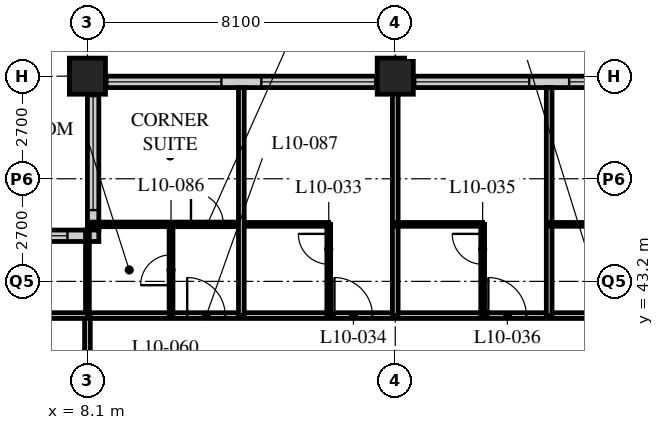
"""IFC4 building model, lengths in metres.
Left out: names, types, materials, properties, quantities, classifications, styles, units other than length and angle.
Written with IfcOpenShell. Run it as: python <this file> out.ifc"""

import sys

from ifc_helpers import new_model, si_unit, direction, frame, frame_2d, origin, origin_2d, place, context, subcontext, project, spatial, rectangle, hollow_rectangle, extrude, element, fill, save


model = new_model("IFC4")
c1 = context("Model", 3, precision=1e-05, world=origin(), true_north=direction((0.0, 1.0)))
c2 = subcontext(c1, "Body", "Model", "MODEL_VIEW")
j1 = project(units=[si_unit("LENGTHUNIT", "METRE"), si_unit("PLANEANGLEUNIT", "RADIAN")], contexts=[c1])
p1 = place(None, origin())
s1 = spatial("IfcSite", under=j1, at=p1, CompositionType="ELEMENT")
p2 = place(p1, origin())
s2 = spatial("IfcBuilding", under=s1, at=p2, CompositionType="ELEMENT")
p3 = place(p2, frame((0.0, 0.0, 46.6)))
s3 = spatial("IfcBuildingStorey", under=s2, at=p3, CompositionType="ELEMENT", Elevation=46.6)
for number, where, z_axis, x_axis in (
    (1, (8.1, 48.6, 0.0), (0.0, 0.0, 1.0), (1.0, 0.0, 0.0)),
    (2, (16.2, 48.6, 0.0), (0.0, 0.0, 1.0), (1.0, 0.0, 0.0)),
):
    element("IfcColumn", number, at=place(p3, frame(where, z_axis=z_axis, x_axis=x_axis)), inside=s3, PredefinedType="COLUMN", context=c2, shape_type="SweptSolid", body=[
        extrude(hollow_rectangle(XDim=0.95, YDim=0.95, WallThickness=0.095, at=origin_2d()), origin(), (0.0, 0.0, 1.0), 3.4),
    ])
p4 = place(p3, frame((48.3, 48.45, 0.0), z_axis=(0.0, 0.0, 1.0), x_axis=(-1.0, 0.0, 0.0)))
e3 = element("IfcWall", 3, at=p4, inside=s3, PredefinedType="SOLIDWALL", context=c2, shape_type="SweptSolid", body=[
    extrude(rectangle(XDim=40.2, YDim=0.3, at=frame_2d((20.1, 0.0))), origin(), (0.0, 0.0, 1.0), 3.19),
])
p5 = place(p4, frame((0.225, 0.0, 0.9)))
e4 = element("IfcOpeningElement", 4, at=p5, cuts=e3, PredefinedType="OPENING", context=c2, shape_type="SweptSolid", body=[
    extrude(rectangle(XDim=3.0, YDim=2.0, at=frame_2d((1.5, 1.0))), frame((0.0, 0.16, 0.0), z_axis=(0.0, -1.0, 0.0), x_axis=(1.0, 0.0, 0.0)), (0.0, 0.0, 1.0), 0.32),
])
p6 = place(p4, frame((4.275, 0.0, 0.9)))
e5 = element("IfcOpeningElement", 5, at=p6, cuts=e3, PredefinedType="OPENING", context=c2, shape_type="SweptSolid", body=[
    extrude(rectangle(XDim=3.0, YDim=2.0, at=frame_2d((1.5, 1.0))), frame((0.0, 0.16, 0.0), z_axis=(0.0, -1.0, 0.0), x_axis=(1.0, 0.0, 0.0)), (0.0, 0.0, 1.0), 0.32),
])
p7 = place(p4, frame((8.325, 0.0, 0.9)))
e6 = element("IfcOpeningElement", 6, at=p7, cuts=e3, PredefinedType="OPENING", context=c2, shape_type="SweptSolid", body=[
    extrude(rectangle(XDim=3.0, YDim=2.0, at=frame_2d((1.5, 1.0))), frame((0.0, 0.16, 0.0), z_axis=(0.0, -1.0, 0.0), x_axis=(1.0, 0.0, 0.0)), (0.0, 0.0, 1.0), 0.32),
])
p8 = place(p4, frame((12.375, 0.0, 0.9)))
e7 = element("IfcOpeningElement", 7, at=p8, cuts=e3, PredefinedType="OPENING", context=c2, shape_type="SweptSolid", body=[
    extrude(rectangle(XDim=3.0, YDim=2.0, at=frame_2d((1.5, 1.0))), frame((0.0, 0.16, 0.0), z_axis=(0.0, -1.0, 0.0), x_axis=(1.0, 0.0, 0.0)), (0.0, 0.0, 1.0), 0.32),
])
p9 = place(p4, frame((16.425, 0.0, 0.9)))
e8 = element("IfcOpeningElement", 8, at=p9, cuts=e3, PredefinedType="OPENING", context=c2, shape_type="SweptSolid", body=[
    extrude(rectangle(XDim=3.0, YDim=2.0, at=frame_2d((1.5, 1.0))), frame((0.0, 0.16, 0.0), z_axis=(0.0, -1.0, 0.0), x_axis=(1.0, 0.0, 0.0)), (0.0, 0.0, 1.0), 0.32),
])
p10 = place(p4, frame((20.475, 0.0, 0.9)))
e9 = element("IfcOpeningElement", 9, at=p10, cuts=e3, PredefinedType="OPENING", context=c2, shape_type="SweptSolid", body=[
    extrude(rectangle(XDim=3.0, YDim=2.0, at=frame_2d((1.5, 1.0))), frame((0.0, 0.16, 0.0), z_axis=(0.0, -1.0, 0.0), x_axis=(1.0, 0.0, 0.0)), (0.0, 0.0, 1.0), 0.32),
])
p11 = place(p4, frame((24.525, 0.0, 0.9)))
e10 = element("IfcOpeningElement", 10, at=p11, cuts=e3, PredefinedType="OPENING", context=c2, shape_type="SweptSolid", body=[
    extrude(rectangle(XDim=3.0, YDim=2.0, at=frame_2d((1.5, 1.0))), frame((0.0, 0.16, 0.0), z_axis=(0.0, -1.0, 0.0), x_axis=(1.0, 0.0, 0.0)), (0.0, 0.0, 1.0), 0.32),
])
p12 = place(p4, frame((28.575, 0.0, 0.9)))
e11 = element("IfcOpeningElement", 11, at=p12, cuts=e3, PredefinedType="OPENING", context=c2, shape_type="SweptSolid", body=[
    extrude(rectangle(XDim=3.0, YDim=2.0, at=frame_2d((1.5, 1.0))), frame((0.0, 0.16, 0.0), z_axis=(0.0, -1.0, 0.0), x_axis=(1.0, 0.0, 0.0)), (0.0, 0.0, 1.0), 0.32),
])
p13 = place(p4, frame((32.625, 0.0, 0.9)))
e12 = element("IfcOpeningElement", 12, at=p13, cuts=e3, PredefinedType="OPENING", context=c2, shape_type="SweptSolid", body=[
    extrude(rectangle(XDim=3.0, YDim=2.0, at=frame_2d((1.5, 1.0))), frame((0.0, 0.16, 0.0), z_axis=(0.0, -1.0, 0.0), x_axis=(1.0, 0.0, 0.0)), (0.0, 0.0, 1.0), 0.32),
])
p14 = place(p4, frame((36.675, 0.0, 0.9)))
e13 = element("IfcOpeningElement", 13, at=p14, cuts=e3, PredefinedType="OPENING", context=c2, shape_type="SweptSolid", body=[
    extrude(rectangle(XDim=3.0, YDim=2.0, at=frame_2d((1.5, 1.0))), frame((0.0, 0.16, 0.0), z_axis=(0.0, -1.0, 0.0), x_axis=(1.0, 0.0, 0.0)), (0.0, 0.0, 1.0), 0.32),
])
p15 = place(p3, frame((8.25, 48.3, 0.0), z_axis=(0.0, 0.0, 1.0), x_axis=(0.0, -1.0, 0.0)))
e14 = element("IfcWall", 14, at=p15, inside=s3, PredefinedType="SOLIDWALL", context=c2, shape_type="SweptSolid", body=[
    extrude(rectangle(XDim=3.75, YDim=0.3, at=frame_2d((1.875, 0.0))), origin(), (0.0, 0.0, 1.0), 3.19),
])
p16 = place(p15, frame((0.225, 0.0, 0.9)))
e15 = element("IfcOpeningElement", 15, at=p16, cuts=e14, PredefinedType="OPENING", context=c2, shape_type="SweptSolid", body=[
    extrude(rectangle(XDim=3.0, YDim=1.5, at=frame_2d((1.5, 0.75))), frame((0.0, 0.16, 0.0), z_axis=(0.0, -1.0, 0.0), x_axis=(1.0, 0.0, 0.0)), (0.0, 0.0, 1.0), 0.32),
])
p17 = place(p3, frame((8.4, 44.4, 0.0), z_axis=(0.0, 0.0, 1.0), x_axis=(-1.0, 0.0, 0.0)))
e16 = element("IfcWall", 16, at=p17, inside=s3, PredefinedType="SOLIDWALL", context=c2, shape_type="SweptSolid", body=[
    extrude(rectangle(XDim=4.35, YDim=0.3, at=frame_2d((2.175, 0.0))), origin(), (0.0, 0.0, 1.0), 3.19),
])
p18 = place(p17, frame((0.825, 0.0, 0.9)))
e17 = element("IfcOpeningElement", 17, at=p18, cuts=e16, PredefinedType="OPENING", context=c2, shape_type="SweptSolid", body=[
    extrude(rectangle(XDim=3.0, YDim=1.5, at=frame_2d((1.5, 0.75))), frame((0.0, 0.16, 0.0), z_axis=(0.0, -1.0, 0.0), x_axis=(1.0, 0.0, 0.0)), (0.0, 0.0, 1.0), 0.32),
])
p19 = place(p3, frame((8.1, 42.3, 0.0), z_axis=(0.0, 0.0, 1.0), x_axis=(1.0, 0.0, 0.0)))
e18 = element("IfcWall", 18, at=p19, inside=s3, PredefinedType="PARTITIONING", context=c2, shape_type="SweptSolid", body=[
    extrude(rectangle(XDim=40.5, YDim=0.15, at=frame_2d((20.25, 0.0))), origin(), (0.0, 0.0, 1.0), 3.19),
])
p20 = place(p19, frame((6.5, 0.0, 0.0)))
e19 = element("IfcOpeningElement", 19, at=p20, cuts=e18, PredefinedType="OPENING", context=c2, shape_type="SweptSolid", body=[
    extrude(rectangle(XDim=1.0, YDim=2.1, at=frame_2d((0.5, 1.05))), frame((0.0, 0.085, 0.0), z_axis=(0.0, -1.0, 0.0), x_axis=(1.0, 0.0, 0.0)), (0.0, 0.0, 1.0), 0.17),
])
p21 = place(p19, frame((10.55, 0.0, 0.0)))
e20 = element("IfcOpeningElement", 20, at=p21, cuts=e18, PredefinedType="OPENING", context=c2, shape_type="SweptSolid", body=[
    extrude(rectangle(XDim=1.0, YDim=2.1, at=frame_2d((0.5, 1.05))), frame((0.0, 0.085, 0.0), z_axis=(0.0, -1.0, 0.0), x_axis=(1.0, 0.0, 0.0)), (0.0, 0.0, 1.0), 0.17),
])
p22 = place(p19, frame((14.6, 0.0, 0.0)))
e21 = element("IfcOpeningElement", 21, at=p22, cuts=e18, PredefinedType="OPENING", context=c2, shape_type="SweptSolid", body=[
    extrude(rectangle(XDim=1.0, YDim=2.1, at=frame_2d((0.5, 1.05))), frame((0.0, 0.085, 0.0), z_axis=(0.0, -1.0, 0.0), x_axis=(1.0, 0.0, 0.0)), (0.0, 0.0, 1.0), 0.17),
])
p23 = place(p19, frame((18.65, 0.0, 0.0)))
e22 = element("IfcOpeningElement", 22, at=p23, cuts=e18, PredefinedType="OPENING", context=c2, shape_type="SweptSolid", body=[
    extrude(rectangle(XDim=1.0, YDim=2.1, at=frame_2d((0.5, 1.05))), frame((0.0, 0.085, 0.0), z_axis=(0.0, -1.0, 0.0), x_axis=(1.0, 0.0, 0.0)), (0.0, 0.0, 1.0), 0.17),
])
p24 = place(p19, frame((22.7, 0.0, 0.0)))
e23 = element("IfcOpeningElement", 23, at=p24, cuts=e18, PredefinedType="OPENING", context=c2, shape_type="SweptSolid", body=[
    extrude(rectangle(XDim=1.0, YDim=2.1, at=frame_2d((0.5, 1.05))), frame((0.0, 0.085, 0.0), z_axis=(0.0, -1.0, 0.0), x_axis=(1.0, 0.0, 0.0)), (0.0, 0.0, 1.0), 0.17),
])
p25 = place(p19, frame((26.75, 0.0, 0.0)))
e24 = element("IfcOpeningElement", 24, at=p25, cuts=e18, PredefinedType="OPENING", context=c2, shape_type="SweptSolid", body=[
    extrude(rectangle(XDim=1.0, YDim=2.1, at=frame_2d((0.5, 1.05))), frame((0.0, 0.085, 0.0), z_axis=(0.0, -1.0, 0.0), x_axis=(1.0, 0.0, 0.0)), (0.0, 0.0, 1.0), 0.17),
])
p26 = place(p19, frame((30.8, 0.0, 0.0)))
e25 = element("IfcOpeningElement", 25, at=p26, cuts=e18, PredefinedType="OPENING", context=c2, shape_type="SweptSolid", body=[
    extrude(rectangle(XDim=1.0, YDim=2.1, at=frame_2d((0.5, 1.05))), frame((0.0, 0.085, 0.0), z_axis=(0.0, -1.0, 0.0), x_axis=(1.0, 0.0, 0.0)), (0.0, 0.0, 1.0), 0.17),
])
p27 = place(p19, frame((34.85, 0.0, 0.0)))
e26 = element("IfcOpeningElement", 26, at=p27, cuts=e18, PredefinedType="OPENING", context=c2, shape_type="SweptSolid", body=[
    extrude(rectangle(XDim=1.0, YDim=2.1, at=frame_2d((0.5, 1.05))), frame((0.0, 0.085, 0.0), z_axis=(0.0, -1.0, 0.0), x_axis=(1.0, 0.0, 0.0)), (0.0, 0.0, 1.0), 0.17),
])
p28 = place(p19, frame((36.875, 0.0, 0.0)))
e27 = element("IfcOpeningElement", 27, at=p28, cuts=e18, PredefinedType="OPENING", context=c2, shape_type="SweptSolid", body=[
    extrude(rectangle(XDim=1.0, YDim=2.1, at=frame_2d((0.5, 1.05))), frame((0.0, 0.085, 0.0), z_axis=(0.0, -1.0, 0.0), x_axis=(1.0, 0.0, 0.0)), (0.0, 0.0, 1.0), 0.17),
])
p29 = place(p19, frame((2.625, 0.0, 0.0)))
e28 = element("IfcOpeningElement", 28, at=p29, cuts=e18, PredefinedType="OPENING", context=c2, shape_type="SweptSolid", body=[
    extrude(rectangle(XDim=1.0, YDim=2.1, at=frame_2d((0.5, 1.05))), frame((0.0, 0.085, 0.0), z_axis=(0.0, -1.0, 0.0), x_axis=(1.0, 0.0, 0.0)), (0.0, 0.0, 1.0), 0.17),
])
p30 = place(p3, frame((8.1, 16.2, 0.0), z_axis=(0.0, 0.0, 1.0), x_axis=(0.0, 1.0, 0.0)))
e29 = element("IfcWall", 29, at=p30, inside=s3, PredefinedType="PARTITIONING", context=c2, shape_type="SweptSolid", body=[
    extrude(rectangle(XDim=26.1, YDim=0.15, at=frame_2d((13.05, 0.0))), origin(), (0.0, 0.0, 1.0), 2.578),
])
p31 = place(p30, frame((2.75, 0.0, 0.0)))
e30 = element("IfcOpeningElement", 30, at=p31, cuts=e29, PredefinedType="OPENING", context=c2, shape_type="SweptSolid", body=[
    extrude(rectangle(XDim=1.0, YDim=2.1, at=frame_2d((0.5, 1.05))), frame((0.0, 0.085, 0.0), z_axis=(0.0, -1.0, 0.0), x_axis=(1.0, 0.0, 0.0)), (0.0, 0.0, 1.0), 0.17),
])
p32 = place(p30, frame((4.35, 0.0, 0.0)))
e31 = element("IfcOpeningElement", 31, at=p32, cuts=e29, PredefinedType="OPENING", context=c2, shape_type="SweptSolid", body=[
    extrude(rectangle(XDim=1.0, YDim=2.1, at=frame_2d((0.5, 1.05))), frame((0.0, 0.085, 0.0), z_axis=(0.0, -1.0, 0.0), x_axis=(1.0, 0.0, 0.0)), (0.0, 0.0, 1.0), 0.17),
])
p33 = place(p30, frame((10.85, 0.0, 0.0)))
e32 = element("IfcOpeningElement", 32, at=p33, cuts=e29, PredefinedType="OPENING", context=c2, shape_type="SweptSolid", body=[
    extrude(rectangle(XDim=1.0, YDim=2.1, at=frame_2d((0.5, 1.05))), frame((0.0, 0.085, 0.0), z_axis=(0.0, -1.0, 0.0), x_axis=(1.0, 0.0, 0.0)), (0.0, 0.0, 1.0), 0.17),
])
p34 = place(p30, frame((12.45, 0.0, 0.0)))
e33 = element("IfcOpeningElement", 33, at=p34, cuts=e29, PredefinedType="OPENING", context=c2, shape_type="SweptSolid", body=[
    extrude(rectangle(XDim=1.0, YDim=2.1, at=frame_2d((0.5, 1.05))), frame((0.0, 0.085, 0.0), z_axis=(0.0, -1.0, 0.0), x_axis=(1.0, 0.0, 0.0)), (0.0, 0.0, 1.0), 0.17),
])
p35 = place(p30, frame((18.65, 0.0, 0.0)))
e34 = element("IfcOpeningElement", 34, at=p35, cuts=e29, PredefinedType="OPENING", context=c2, shape_type="SweptSolid", body=[
    extrude(rectangle(XDim=1.0, YDim=2.1, at=frame_2d((0.5, 1.05))), frame((0.0, 0.085, 0.0), z_axis=(0.0, -1.0, 0.0), x_axis=(1.0, 0.0, 0.0)), (0.0, 0.0, 1.0), 0.17),
])
p36 = place(p30, frame((22.7, 0.0, 0.0)))
e35 = element("IfcOpeningElement", 35, at=p36, cuts=e29, PredefinedType="OPENING", context=c2, shape_type="SweptSolid", body=[
    extrude(rectangle(XDim=1.0, YDim=2.1, at=frame_2d((0.5, 1.05))), frame((0.0, 0.085, 0.0), z_axis=(0.0, -1.0, 0.0), x_axis=(1.0, 0.0, 0.0)), (0.0, 0.0, 1.0), 0.17),
])
p37 = place(p3, frame((12.15, 44.7, 0.0), z_axis=(0.0, 0.0, 1.0), x_axis=(1.0, 0.0, 0.0)))
e36 = element("IfcWall", 36, at=p37, inside=s3, PredefinedType="PARTITIONING", context=c2, shape_type="SweptSolid", body=[
    extrude(rectangle(XDim=2.3, YDim=0.1, at=frame_2d((1.15, 0.0))), origin(), (0.0, 0.0, 1.0), 3.19),
])
p38 = place(p3, frame((14.45, 42.3, 0.0), z_axis=(0.0, 0.0, 1.0), x_axis=(0.0, 1.0, 0.0)))
e37 = element("IfcWall", 37, at=p38, inside=s3, PredefinedType="PARTITIONING", context=c2, shape_type="SweptSolid", body=[
    extrude(rectangle(XDim=2.4, YDim=0.1, at=frame_2d((1.2, 0.0))), origin(), (0.0, 0.0, 1.0), 3.19),
])
p39 = place(p38, frame((1.35, 0.0, 0.0)))
e38 = element("IfcOpeningElement", 38, at=p39, cuts=e37, PredefinedType="OPENING", context=c2, shape_type="SweptSolid", body=[
    extrude(rectangle(XDim=0.8, YDim=2.1, at=frame_2d((0.4, 1.05))), frame((0.0, 0.06, 0.0), z_axis=(0.0, -1.0, 0.0), x_axis=(1.0, 0.0, 0.0)), (0.0, 0.0, 1.0), 0.12),
])
p40 = place(p3, frame((16.2, 42.3, 0.0), z_axis=(0.0, 0.0, 1.0), x_axis=(0.0, 1.0, 0.0)))
e39 = element("IfcWall", 39, at=p40, inside=s3, PredefinedType="PARTITIONING", context=c2, shape_type="SweptSolid", body=[
    extrude(rectangle(XDim=6.0, YDim=0.15, at=frame_2d((3.0, 0.0))), origin(), (0.0, 0.0, 1.0), 2.578),
])
p41 = place(p3, frame((16.2, 44.7, 0.0), z_axis=(0.0, 0.0, 1.0), x_axis=(1.0, 0.0, 0.0)))
e40 = element("IfcWall", 40, at=p41, inside=s3, PredefinedType="PARTITIONING", context=c2, shape_type="SweptSolid", body=[
    extrude(rectangle(XDim=2.3, YDim=0.1, at=frame_2d((1.15, 0.0))), origin(), (0.0, 0.0, 1.0), 3.19),
])
p42 = place(p3, frame((18.5, 42.3, 0.0), z_axis=(0.0, 0.0, 1.0), x_axis=(0.0, 1.0, 0.0)))
e41 = element("IfcWall", 41, at=p42, inside=s3, PredefinedType="PARTITIONING", context=c2, shape_type="SweptSolid", body=[
    extrude(rectangle(XDim=2.4, YDim=0.1, at=frame_2d((1.2, 0.0))), origin(), (0.0, 0.0, 1.0), 3.19),
])
p43 = place(p42, frame((1.35, 0.0, 0.0)))
e42 = element("IfcOpeningElement", 42, at=p43, cuts=e41, PredefinedType="OPENING", context=c2, shape_type="SweptSolid", body=[
    extrude(rectangle(XDim=0.8, YDim=2.1, at=frame_2d((0.4, 1.05))), frame((0.0, 0.06, 0.0), z_axis=(0.0, -1.0, 0.0), x_axis=(1.0, 0.0, 0.0)), (0.0, 0.0, 1.0), 0.12),
])
p44 = place(p3, frame((20.25, 42.3, 0.0), z_axis=(0.0, 0.0, 1.0), x_axis=(0.0, 1.0, 0.0)))
e43 = element("IfcWall", 43, at=p44, inside=s3, PredefinedType="PARTITIONING", context=c2, shape_type="SweptSolid", body=[
    extrude(rectangle(XDim=6.0, YDim=0.15, at=frame_2d((3.0, 0.0))), origin(), (0.0, 0.0, 1.0), 3.19),
])
p45 = place(p3, frame((20.25, 44.7, 0.0), z_axis=(0.0, 0.0, 1.0), x_axis=(1.0, 0.0, 0.0)))
e44 = element("IfcWall", 44, at=p45, inside=s3, PredefinedType="PARTITIONING", context=c2, shape_type="SweptSolid", body=[
    extrude(rectangle(XDim=2.3, YDim=0.1, at=frame_2d((1.15, 0.0))), origin(), (0.0, 0.0, 1.0), 3.19),
])
p46 = place(p3, frame((8.1, 44.7, 0.0), z_axis=(0.0, 0.0, 1.0), x_axis=(1.0, 0.0, 0.0)))
e45 = element("IfcWall", 45, at=p46, inside=s3, PredefinedType="PARTITIONING", context=c2, shape_type="SweptSolid", body=[
    extrude(rectangle(XDim=4.05, YDim=0.12, at=frame_2d((2.025, 0.0))), origin(), (0.0, 0.0, 1.0), 3.19),
])
p47 = place(p46, frame((2.725, 0.0, 0.0)))
e46 = element("IfcOpeningElement", 46, at=p47, cuts=e45, PredefinedType="OPENING", context=c2, shape_type="SweptSolid", body=[
    extrude(rectangle(XDim=0.85, YDim=2.1, at=frame_2d((0.425, 1.05))), frame((0.0, 0.07, 0.0), z_axis=(0.0, -1.0, 0.0), x_axis=(1.0, 0.0, 0.0)), (0.0, 0.0, 1.0), 0.14),
])
p48 = place(p3, frame((10.3, 42.3, 0.0), z_axis=(0.0, 0.0, 1.0), x_axis=(0.0, 1.0, 0.0)))
e47 = element("IfcWall", 47, at=p48, inside=s3, PredefinedType="PARTITIONING", context=c2, shape_type="SweptSolid", body=[
    extrude(rectangle(XDim=2.4, YDim=0.1, at=frame_2d((1.2, 0.0))), origin(), (0.0, 0.0, 1.0), 3.19),
])
p49 = place(p48, frame((0.8, 0.0, 0.0)))
e48 = element("IfcOpeningElement", 48, at=p49, cuts=e47, PredefinedType="OPENING", context=c2, shape_type="SweptSolid", body=[
    extrude(rectangle(XDim=0.8, YDim=2.1, at=frame_2d((0.4, 1.05))), frame((0.0, 0.06, 0.0), z_axis=(0.0, -1.0, 0.0), x_axis=(1.0, 0.0, 0.0)), (0.0, 0.0, 1.0), 0.12),
])
p50 = place(p3, frame((8.1, 42.3, 0.0), z_axis=(0.0, 0.0, 1.0), x_axis=(0.0, 1.0, 0.0)))
e49 = element("IfcWall", 49, at=p50, inside=s3, PredefinedType="PARTITIONING", context=c2, shape_type="SweptSolid", body=[
    extrude(rectangle(XDim=2.25, YDim=0.1, at=frame_2d((1.125, 0.0))), origin(), (0.0, 0.0, 1.0), 2.578),
])
p51 = place(p3, frame((4.35, 42.3, 0.0), z_axis=(0.0, 0.0, 1.0), x_axis=(1.0, 0.0, 0.0)))
e50 = element("IfcWall", 50, at=p51, inside=s3, PredefinedType="PARTITIONING", context=c2, shape_type="SweptSolid", body=[
    extrude(rectangle(XDim=3.75, YDim=0.15, at=frame_2d((1.875, 0.0))), origin(), (0.0, 0.0, 1.0), 3.19),
])
p52 = place(p3, frame((12.15, 42.3, 0.0), z_axis=(0.0, 0.0, 1.0), x_axis=(0.0, 1.0, 0.0)))
e51 = element("IfcWall", 51, at=p52, inside=s3, PredefinedType="PARTITIONING", context=c2, shape_type="SweptSolid", body=[
    extrude(rectangle(XDim=6.0, YDim=0.15, at=frame_2d((3.0, 0.0))), origin(), (0.0, 0.0, 1.0), 3.19),
])
p53 = place(p11, origin())
e52 = element("IfcWindow", 52, at=p53, inside=s3, PartitioningType="SINGLE_PANEL", PredefinedType="WINDOW", context=c2, shape_type="SweptSolid", body=[
    extrude(rectangle(XDim=3.0, YDim=2.0, at=frame_2d((1.5, 1.0))), frame((0.0, 0.03, 0.0), z_axis=(0.0, -1.0, 0.0), x_axis=(1.0, 0.0, 0.0)), (0.0, 0.0, 1.0), 0.06),
])
fill(e10, e52)
p54 = place(p12, origin())
e53 = element("IfcWindow", 53, at=p54, inside=s3, PartitioningType="SINGLE_PANEL", PredefinedType="WINDOW", context=c2, shape_type="SweptSolid", body=[
    extrude(rectangle(XDim=3.0, YDim=2.0, at=frame_2d((1.5, 1.0))), frame((0.0, 0.03, 0.0), z_axis=(0.0, -1.0, 0.0), x_axis=(1.0, 0.0, 0.0)), (0.0, 0.0, 1.0), 0.06),
])
fill(e11, e53)
p55 = place(p13, origin())
e54 = element("IfcWindow", 54, at=p55, inside=s3, PartitioningType="SINGLE_PANEL", PredefinedType="WINDOW", context=c2, shape_type="SweptSolid", body=[
    extrude(rectangle(XDim=3.0, YDim=2.0, at=frame_2d((1.5, 1.0))), frame((0.0, 0.03, 0.0), z_axis=(0.0, -1.0, 0.0), x_axis=(1.0, 0.0, 0.0)), (0.0, 0.0, 1.0), 0.06),
])
fill(e12, e54)
p56 = place(p14, origin())
e55 = element("IfcWindow", 55, at=p56, inside=s3, PartitioningType="SINGLE_PANEL", PredefinedType="WINDOW", context=c2, shape_type="SweptSolid", body=[
    extrude(rectangle(XDim=3.0, YDim=2.0, at=frame_2d((1.5, 1.0))), frame((0.0, 0.03, 0.0), z_axis=(0.0, -1.0, 0.0), x_axis=(1.0, 0.0, 0.0)), (0.0, 0.0, 1.0), 0.06),
])
fill(e13, e55)
p57 = place(p16, origin())
e56 = element("IfcWindow", 56, at=p57, inside=s3, PartitioningType="SINGLE_PANEL", PredefinedType="WINDOW", context=c2, shape_type="SweptSolid", body=[
    extrude(rectangle(XDim=3.0, YDim=1.5, at=frame_2d((1.5, 0.75))), frame((0.0, 0.03, 0.0), z_axis=(0.0, -1.0, 0.0), x_axis=(1.0, 0.0, 0.0)), (0.0, 0.0, 1.0), 0.06),
])
fill(e15, e56)
p58 = place(p18, origin())
e57 = element("IfcWindow", 57, at=p58, inside=s3, PartitioningType="SINGLE_PANEL", PredefinedType="WINDOW", context=c2, shape_type="SweptSolid", body=[
    extrude(rectangle(XDim=3.0, YDim=1.5, at=frame_2d((1.5, 0.75))), frame((0.0, 0.03, 0.0), z_axis=(0.0, -1.0, 0.0), x_axis=(1.0, 0.0, 0.0)), (0.0, 0.0, 1.0), 0.06),
])
fill(e17, e57)
p59 = place(p39, origin())
e58 = element("IfcDoor", 58, at=p59, inside=s3, OperationType="SINGLE_SWING_RIGHT", PredefinedType="DOOR", context=c2, shape_type="SweptSolid", body=[
    extrude(rectangle(XDim=0.8, YDim=2.1, at=frame_2d((0.4, 1.05))), frame((0.0, 0.025, 0.0), z_axis=(0.0, -1.0, 0.0), x_axis=(1.0, 0.0, 0.0)), (0.0, 0.0, 1.0), 0.05),
])
fill(e38, e58)
p60 = place(p20, origin())
e59 = element("IfcDoor", 59, at=p60, inside=s3, OperationType="SINGLE_SWING_LEFT", PredefinedType="DOOR", context=c2, shape_type="SweptSolid", body=[
    extrude(rectangle(XDim=1.0, YDim=2.1, at=frame_2d((0.5, 1.05))), frame((0.0, 0.025, 0.0), z_axis=(0.0, -1.0, 0.0), x_axis=(1.0, 0.0, 0.0)), (0.0, 0.0, 1.0), 0.05),
])
fill(e19, e59)
p61 = place(p43, origin())
e60 = element("IfcDoor", 60, at=p61, inside=s3, OperationType="SINGLE_SWING_RIGHT", PredefinedType="DOOR", context=c2, shape_type="SweptSolid", body=[
    extrude(rectangle(XDim=0.8, YDim=2.1, at=frame_2d((0.4, 1.05))), frame((0.0, 0.025, 0.0), z_axis=(0.0, -1.0, 0.0), x_axis=(1.0, 0.0, 0.0)), (0.0, 0.0, 1.0), 0.05),
])
fill(e42, e60)
p62 = place(p21, origin())
e61 = element("IfcDoor", 61, at=p62, inside=s3, OperationType="SINGLE_SWING_LEFT", PredefinedType="DOOR", context=c2, shape_type="SweptSolid", body=[
    extrude(rectangle(XDim=1.0, YDim=2.1, at=frame_2d((0.5, 1.05))), frame((0.0, 0.025, 0.0), z_axis=(0.0, -1.0, 0.0), x_axis=(1.0, 0.0, 0.0)), (0.0, 0.0, 1.0), 0.05),
])
fill(e20, e61)
p63 = place(p49, origin())
e62 = element("IfcDoor", 62, at=p63, inside=s3, OperationType="SINGLE_SWING_LEFT", PredefinedType="DOOR", context=c2, shape_type="SweptSolid", body=[
    extrude(rectangle(XDim=0.8, YDim=2.1, at=frame_2d((0.4, 1.05))), frame((0.0, 0.025, 0.0), z_axis=(0.0, -1.0, 0.0), x_axis=(1.0, 0.0, 0.0)), (0.0, 0.0, 1.0), 0.05),
])
fill(e48, e62)
p64 = place(p29, origin())
e63 = element("IfcDoor", 63, at=p64, inside=s3, OperationType="SINGLE_SWING_LEFT", PredefinedType="DOOR", context=c2, shape_type="SweptSolid", body=[
    extrude(rectangle(XDim=1.0, YDim=2.1, at=frame_2d((0.5, 1.05))), frame((0.0, 0.025, 0.0), z_axis=(0.0, -1.0, 0.0), x_axis=(1.0, 0.0, 0.0)), (0.0, 0.0, 1.0), 0.05),
])
fill(e28, e63)
p65 = place(p47, origin())
e64 = element("IfcDoor", 64, at=p65, inside=s3, OperationType="SINGLE_SWING_LEFT", PredefinedType="DOOR", context=c2, shape_type="SweptSolid", body=[
    extrude(rectangle(XDim=0.85, YDim=2.1, at=frame_2d((0.425, 1.05))), frame((0.0, 0.025, 0.0), z_axis=(0.0, -1.0, 0.0), x_axis=(1.0, 0.0, 0.0)), (0.0, 0.0, 1.0), 0.05),
])
fill(e46, e64)
save(model, sys.argv[1])
